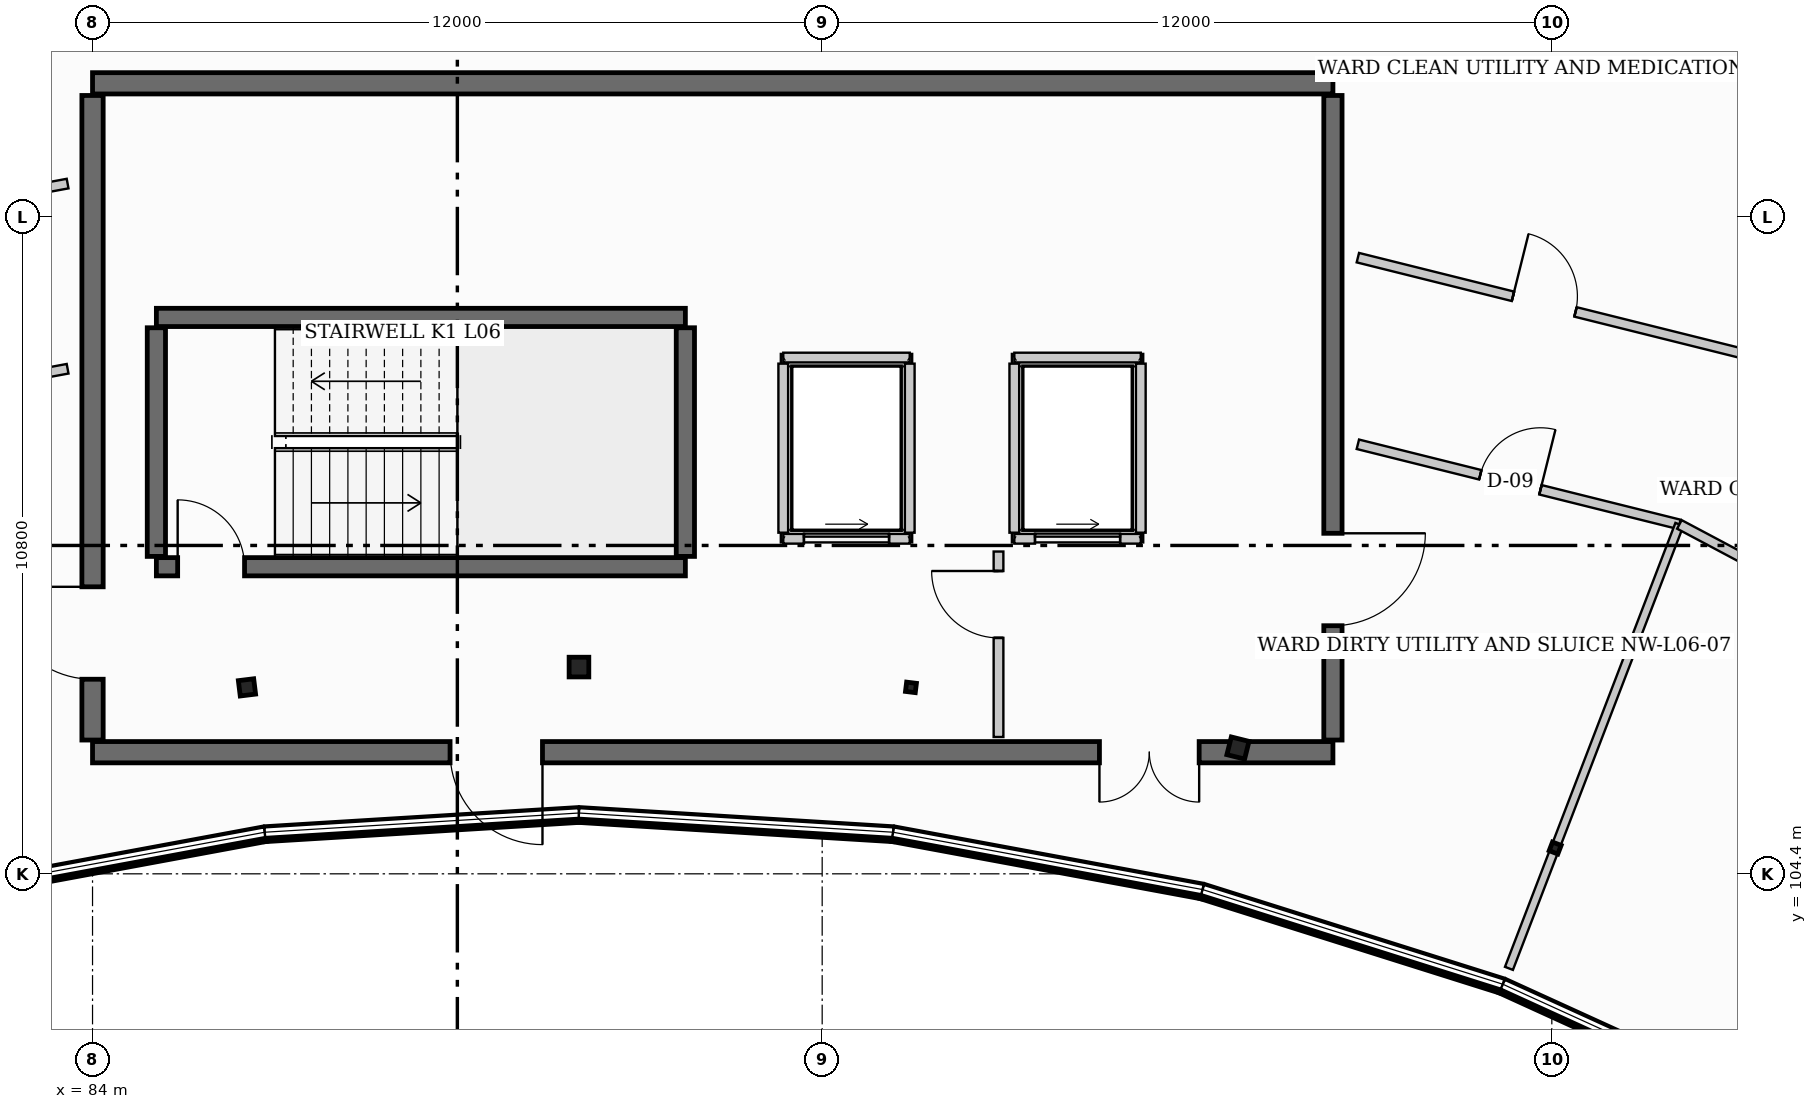
"""IFC4 building model, lengths in metres.
Left out: names, types, materials, properties, quantities, classifications, styles, units other than length and angle.
Written with IfcOpenShell. Run it as: python <this file> out.ifc"""

import sys

from ifc_helpers import new_model, si_unit, direction, frame, frame_2d, origin, origin_2d, place, context, subcontext, project, spatial, rectangle, hollow_rectangle, hollow_circle, i_section, extrude, element, fill, save


model = new_model("IFC4")
c1 = context("Model", 3, precision=1e-05, world=origin(), true_north=direction((0.0, 1.0)))
c2 = subcontext(c1, "Body", "Model", "MODEL_VIEW")
j1 = project(units=[si_unit("LENGTHUNIT", "METRE"), si_unit("PLANEANGLEUNIT", "RADIAN")], contexts=[c1])
p1 = place(None, origin())
s1 = spatial("IfcSite", under=j1, at=p1, CompositionType="ELEMENT")
p2 = place(p1, origin())
s2 = spatial("IfcBuilding", under=s1, at=p2, CompositionType="ELEMENT")
p3 = place(p2, frame((0.0, 0.0, 26.1)))
s3 = spatial("IfcBuildingStorey", under=s2, at=p3, CompositionType="ELEMENT", Elevation=26.1)
p4 = place(p3, frame((86.54, 107.466, 0.0), z_axis=(0.0, 0.0, 1.0), x_axis=(-0.121869343405, 0.992546151641, 0.0)))
e1 = element("IfcColumn", 1, at=p4, inside=s3, PredefinedType="COLUMN", context=c2, shape_type="SweptSolid", body=[
    extrude(i_section(OverallWidth=0.254, OverallDepth=0.254, WebThickness=0.009, FlangeThickness=0.014, at=origin_2d()), origin(), (0.0, 0.0, 1.0), 3.9),
])
p5 = place(p3, frame((92.0, 107.8, 0.0), z_axis=(0.0, 0.0, 1.0), x_axis=(0.0, 1.0, 0.0)))
e2 = element("IfcColumn", 2, at=p5, inside=s3, PredefinedType="COLUMN", context=c2, shape_type="SweptSolid", body=[
    extrude(hollow_circle(Radius=0.162, WallThickness=0.013, at=origin_2d()), origin(), (0.0, 0.0, 1.0), 3.9),
])
p6 = place(p3, frame((97.46, 107.466, 0.0), z_axis=(0.0, 0.0, 1.0), x_axis=(0.121869343405, 0.992546151641, 0.0)))
e3 = element("IfcColumn", 3, at=p6, inside=s3, PredefinedType="COLUMN", context=c2, shape_type="SweptSolid", body=[
    extrude(i_section(OverallWidth=0.154, OverallDepth=0.162, WebThickness=0.008, FlangeThickness=0.011, at=origin_2d()), origin(), (0.0, 0.0, 1.0), 3.9),
])
p7 = place(p3, frame((102.838, 106.469, 0.0), z_axis=(0.0, 0.0, 1.0), x_axis=(0.2419218956, 0.970295726276, 0.0)))
e4 = element("IfcColumn", 4, at=p7, inside=s3, PredefinedType="COLUMN", context=c2, shape_type="SweptSolid", body=[
    extrude(hollow_rectangle(XDim=0.3, YDim=0.3, WallThickness=0.012, at=origin_2d()), origin(), (0.0, 0.0, 1.0), 3.9),
])
p8 = place(p3, frame((108.055, 104.824, 0.0), z_axis=(0.0, 0.0, 1.0), x_axis=(0.358367949545, 0.933580426497, 0.0)))
e5 = element("IfcColumn", 5, at=p8, inside=s3, PredefinedType="COLUMN", context=c2, shape_type="SweptSolid", body=[
    extrude(i_section(OverallWidth=0.152, OverallDepth=0.152, WebThickness=0.006, FlangeThickness=0.007, at=origin_2d()), origin(), (0.0, 0.0, 1.0), 3.9),
])
p9 = place(p3, frame((84.0, 117.4, 0.0), z_axis=(0.0, 0.0, 1.0), x_axis=(1.0, 0.0, 0.0)))
e6 = element("IfcWall", 6, at=p9, inside=s3, PredefinedType="SHEAR", context=c2, shape_type="SweptSolid", body=[
    extrude(rectangle(XDim=20.4, YDim=0.35, at=frame_2d((10.2, 0.0))), origin(), (0.0, 0.0, 1.0), 3.9),
])
p10 = place(p3, frame((104.4, 106.4, 0.0), z_axis=(0.0, 0.0, 1.0), x_axis=(-1.0, 0.0, 0.0)))
e7 = element("IfcWall", 7, at=p10, inside=s3, PredefinedType="SHEAR", context=c2, shape_type="SweptSolid", body=[
    extrude(rectangle(XDim=20.4, YDim=0.35, at=frame_2d((10.2, 0.0))), origin(), (0.0, 0.0, 1.0), 3.9),
])
p11 = place(p10, frame((2.2, 0.0, 0.0)))
e8 = element("IfcOpeningElement", 8, at=p11, cuts=e7, PredefinedType="OPENING", context=c2, shape_type="SweptSolid", body=[
    extrude(rectangle(XDim=1.64, YDim=2.2, at=frame_2d((0.82, 1.1))), frame((0.0, 0.185, 0.0), z_axis=(0.0, -1.0, 0.0), x_axis=(1.0, 0.0, 0.0)), (0.0, 0.0, 1.0), 0.37),
])
p12 = place(p10, frame((13.0, 0.0, 0.0)))
e9 = element("IfcOpeningElement", 9, at=p12, cuts=e7, PredefinedType="OPENING", context=c2, shape_type="SweptSolid", body=[
    extrude(rectangle(XDim=1.52, YDim=2.16, at=frame_2d((0.76, 1.08))), frame((0.0, 0.185, 0.0), z_axis=(0.0, -1.0, 0.0), x_axis=(1.0, 0.0, 0.0)), (0.0, 0.0, 1.0), 0.37),
])
p13 = place(p3, frame((84.0, 106.6, 0.0), z_axis=(0.0, 0.0, 1.0), x_axis=(0.0, 1.0, 0.0)))
e10 = element("IfcWall", 10, at=p13, inside=s3, PredefinedType="SHEAR", context=c2, shape_type="SweptSolid", body=[
    extrude(rectangle(XDim=10.6, YDim=0.35, at=frame_2d((5.3, 0.0))), origin(), (0.0, 0.0, 1.0), 3.9),
])
p14 = place(p13, frame((1.0, 0.0, 0.0)))
e11 = element("IfcOpeningElement", 11, at=p14, cuts=e10, PredefinedType="OPENING", context=c2, shape_type="SweptSolid", body=[
    extrude(rectangle(XDim=1.52, YDim=2.16, at=frame_2d((0.76, 1.08))), frame((0.0, 0.185, 0.0), z_axis=(0.0, -1.0, 0.0), x_axis=(1.0, 0.0, 0.0)), (0.0, 0.0, 1.0), 0.37),
])
p15 = place(p3, frame((104.4, 117.2, 0.0), z_axis=(0.0, 0.0, 1.0), x_axis=(0.0, -1.0, 0.0)))
e12 = element("IfcWall", 12, at=p15, inside=s3, PredefinedType="SHEAR", context=c2, shape_type="SweptSolid", body=[
    extrude(rectangle(XDim=10.6, YDim=0.3, at=frame_2d((5.3, 0.0))), origin(), (0.0, 0.0, 1.0), 3.9),
])
p16 = place(p15, frame((7.2, 0.0, 0.0)))
e13 = element("IfcOpeningElement", 13, at=p16, cuts=e12, PredefinedType="OPENING", context=c2, shape_type="SweptSolid", body=[
    extrude(rectangle(XDim=1.52, YDim=2.16, at=frame_2d((0.76, 1.08))), frame((0.0, 0.16, 0.0), z_axis=(0.0, -1.0, 0.0), x_axis=(1.0, 0.0, 0.0)), (0.0, 0.0, 1.0), 0.32),
])
p17 = place(p3, frame((85.05, 109.45, 0.0), z_axis=(0.0, 0.0, 1.0), x_axis=(1.0, 0.0, 0.0)))
e14 = element("IfcWall", 14, at=p17, inside=s3, PredefinedType="SHEAR", context=c2, shape_type="SweptSolid", body=[
    extrude(rectangle(XDim=8.7, YDim=0.3, at=frame_2d((4.35, 0.0))), origin(), (0.0, 0.0, 1.0), 3.9),
])
p18 = place(p17, frame((0.35, 0.0, 0.0)))
e15 = element("IfcOpeningElement", 15, at=p18, cuts=e14, PredefinedType="OPENING", context=c2, shape_type="SweptSolid", body=[
    extrude(rectangle(XDim=1.1, YDim=2.15, at=frame_2d((0.55, 1.075))), frame((0.0, 0.16, 0.0), z_axis=(0.0, -1.0, 0.0), x_axis=(1.0, 0.0, 0.0)), (0.0, 0.0, 1.0), 0.32),
])
p19 = place(p3, frame((93.75, 113.55, 0.0), z_axis=(0.0, 0.0, 1.0), x_axis=(-1.0, 0.0, 0.0)))
e16 = element("IfcWall", 16, at=p19, inside=s3, PredefinedType="SHEAR", context=c2, shape_type="SweptSolid", body=[
    extrude(rectangle(XDim=8.7, YDim=0.3, at=frame_2d((4.35, 0.0))), origin(), (0.0, 0.0, 1.0), 3.9),
])
for number, where, z_axis, x_axis in (
    (17, (85.05, 109.62, 0.0), (0.0, 0.0, 1.0), (0.0, 1.0, 0.0)),
    (18, (93.75, 109.62, 0.0), (0.0, 0.0, 1.0), (0.0, 1.0, 0.0)),
):
    element("IfcWall", number, at=place(p3, frame(where, z_axis=z_axis, x_axis=x_axis)), inside=s3, PredefinedType="SHEAR", context=c2, shape_type="SweptSolid", body=[
        extrude(rectangle(XDim=3.76, YDim=0.3, at=frame_2d((1.88, 0.0))), origin(), (0.0, 0.0, 1.0), 3.9),
    ])
for number, where, z_axis, x_axis in (
    (19, (86.833, 105.084, 0.0), (0.0, 0.0, 1.0), (-0.983, -0.182, 0.0)),
    (20, (92.0, 105.4, 0.0), (0.0, 0.0, 1.0), (-0.998, -0.061, 0.0)),
    (21, (97.167, 105.084, 0.0), (0.0, 0.0, 1.0), (-0.998, 0.061, 0.0)),
    (22, (102.257, 104.141, 0.0), (0.0, 0.0, 1.0), (-0.983, 0.182, 0.0)),
):
    element("IfcWall", number, at=place(p3, frame(where, z_axis=z_axis, x_axis=x_axis)), inside=s3, PredefinedType="STANDARD", context=c2, shape_type="SweptSolid", body=[
        extrude(rectangle(XDim=5.177, YDim=0.22, at=frame_2d((2.588, 0.0))), origin(), (0.0, 0.0, 1.0), 1.05),
    ])
p20 = place(p3, frame((107.195, 102.584, 0.0), z_axis=(0.0, 0.0, 1.0), x_axis=(-0.953706582316, 0.300738681994, 0.0)))
e23 = element("IfcWall", 23, at=p20, inside=s3, PredefinedType="STANDARD", context=c2, shape_type="SweptSolid", body=[
    extrude(rectangle(XDim=5.178, YDim=0.22, at=frame_2d((2.589, 0.0))), origin(), (0.0, 0.0, 1.0), 1.05),
])
p21 = place(p3, frame((111.906, 100.437, 0.0), z_axis=(0.0, 0.0, 1.0), x_axis=(-0.909955822384, 0.414705198074, 0.0)))
e24 = element("IfcWall", 24, at=p21, inside=s3, PredefinedType="STANDARD", context=c2, shape_type="SweptSolid", body=[
    extrude(rectangle(XDim=5.177, YDim=0.22, at=frame_2d((2.588, 0.0))), origin(), (0.0, 0.0, 1.0), 1.05),
])
p22 = place(p3, frame((95.36, 109.91, 0.0), z_axis=(0.0, 0.0, 1.0), x_axis=(1.0, 0.0, 0.0)))
e25 = element("IfcWall", 25, at=p22, inside=s3, PredefinedType="PARTITIONING", context=c2, shape_type="SweptSolid", body=[
    extrude(rectangle(XDim=2.08, YDim=0.16, at=frame_2d((1.04, 0.0))), origin(), (0.0, 0.0, 1.0), 3.545),
])
p23 = place(p22, frame((0.34, 0.0, 0.0)))
e26 = element("IfcOpeningElement", 26, at=p23, cuts=e25, PredefinedType="OPENING", context=c2, shape_type="SweptSolid", body=[
    extrude(rectangle(XDim=1.4, YDim=2.2, at=frame_2d((0.7, 1.1))), frame((0.0, 0.09, 0.0), z_axis=(0.0, -1.0, 0.0), x_axis=(1.0, 0.0, 0.0)), (0.0, 0.0, 1.0), 0.18),
])
p24 = place(p3, frame((97.44, 112.89, 0.0), z_axis=(0.0, 0.0, 1.0), x_axis=(-1.0, 0.0, 0.0)))
e27 = element("IfcWall", 27, at=p24, inside=s3, PredefinedType="PARTITIONING", context=c2, shape_type="SweptSolid", body=[
    extrude(rectangle(XDim=2.08, YDim=0.16, at=frame_2d((1.04, 0.0))), origin(), (0.0, 0.0, 1.0), 3.545),
])
for number, where, z_axis, x_axis in (
    (28, (95.36, 112.79, 0.0), (0.0, 0.0, 1.0), (0.0, -1.0, 0.0)),
    (29, (97.44, 110.01, 0.0), (0.0, 0.0, 1.0), (0.0, 1.0, 0.0)),
):
    element("IfcWall", number, at=place(p3, frame(where, z_axis=z_axis, x_axis=x_axis)), inside=s3, PredefinedType="PARTITIONING", context=c2, shape_type="SweptSolid", body=[
        extrude(rectangle(XDim=2.78, YDim=0.16, at=frame_2d((1.39, 0.0))), origin(), (0.0, 0.0, 1.0), 3.545),
    ])
p25 = place(p3, frame((99.16, 109.91, 0.0), z_axis=(0.0, 0.0, 1.0), x_axis=(1.0, 0.0, 0.0)))
e30 = element("IfcWall", 30, at=p25, inside=s3, PredefinedType="PARTITIONING", context=c2, shape_type="SweptSolid", body=[
    extrude(rectangle(XDim=2.08, YDim=0.16, at=frame_2d((1.04, 0.0))), origin(), (0.0, 0.0, 1.0), 3.545),
])
p26 = place(p25, frame((0.34, 0.0, 0.0)))
e31 = element("IfcOpeningElement", 31, at=p26, cuts=e30, PredefinedType="OPENING", context=c2, shape_type="SweptSolid", body=[
    extrude(rectangle(XDim=1.4, YDim=2.2, at=frame_2d((0.7, 1.1))), frame((0.0, 0.09, 0.0), z_axis=(0.0, -1.0, 0.0), x_axis=(1.0, 0.0, 0.0)), (0.0, 0.0, 1.0), 0.18),
])
p27 = place(p3, frame((101.24, 112.89, 0.0), z_axis=(0.0, 0.0, 1.0), x_axis=(-1.0, 0.0, 0.0)))
e32 = element("IfcWall", 32, at=p27, inside=s3, PredefinedType="PARTITIONING", context=c2, shape_type="SweptSolid", body=[
    extrude(rectangle(XDim=2.08, YDim=0.16, at=frame_2d((1.04, 0.0))), origin(), (0.0, 0.0, 1.0), 3.545),
])
for number, where, z_axis, x_axis in (
    (33, (99.16, 112.79, 0.0), (0.0, 0.0, 1.0), (0.0, -1.0, 0.0)),
    (34, (101.24, 110.01, 0.0), (0.0, 0.0, 1.0), (0.0, 1.0, 0.0)),
):
    element("IfcWall", number, at=place(p3, frame(where, z_axis=z_axis, x_axis=x_axis)), inside=s3, PredefinedType="PARTITIONING", context=c2, shape_type="SweptSolid", body=[
        extrude(rectangle(XDim=2.78, YDim=0.16, at=frame_2d((1.39, 0.0))), origin(), (0.0, 0.0, 1.0), 3.545),
    ])
p28 = place(p3, frame((98.9, 106.65, 0.0), z_axis=(0.0, 0.0, 1.0), x_axis=(0.0, 1.0, 0.0)))
e35 = element("IfcWall", 35, at=p28, inside=s3, PredefinedType="PARTITIONING", context=c2, shape_type="SweptSolid", body=[
    extrude(rectangle(XDim=3.05, YDim=0.16, at=frame_2d((1.525, 0.0))), origin(), (0.0, 0.0, 1.0), 3.28),
])
p29 = place(p28, frame((1.63, 0.0, 0.0)))
e36 = element("IfcOpeningElement", 36, at=p29, cuts=e35, PredefinedType="OPENING", context=c2, shape_type="SweptSolid", body=[
    extrude(rectangle(XDim=1.1, YDim=2.15, at=frame_2d((0.55, 1.075))), frame((0.0, 0.09, 0.0), z_axis=(0.0, -1.0, 0.0), x_axis=(1.0, 0.0, 0.0)), (0.0, 0.0, 1.0), 0.18),
])
p30 = place(p3, frame((79.057, 114.911, 0.0), z_axis=(0.0, 0.0, 1.0), x_axis=(0.983258469263, 0.182216307235, 0.0)))
e37 = element("IfcWall", 37, at=p30, inside=s3, PredefinedType="PARTITIONING", context=c2, shape_type="SweptSolid", body=[
    extrude(rectangle(XDim=4.61, YDim=0.16, at=frame_2d((2.305, 0.0))), origin(), (0.0, 0.0, 1.0), 2.923),
])
p31 = place(p30, frame((1.655, 0.0, 0.0)))
e38 = element("IfcOpeningElement", 38, at=p31, cuts=e37, PredefinedType="OPENING", context=c2, shape_type="SweptSolid", body=[
    extrude(rectangle(XDim=1.2, YDim=2.12, at=frame_2d((0.6, 1.06))), frame((0.0, 0.09, 0.0), z_axis=(0.0, -1.0, 0.0), x_axis=(1.0, 0.0, 0.0)), (0.0, 0.0, 1.0), 0.18),
])
p32 = place(p3, frame((79.783, 112.0, 0.0), z_axis=(0.0, 0.0, 1.0), x_axis=(0.983234305922, 0.182346646962, 0.0)))
e39 = element("IfcWall", 39, at=p32, inside=s3, PredefinedType="PARTITIONING", context=c2, shape_type="SweptSolid", body=[
    extrude(rectangle(XDim=3.872, YDim=0.16, at=frame_2d((1.936, 0.0))), origin(), (0.0, 0.0, 1.0), 2.923),
])
p33 = place(p32, frame((1.286, 0.0, 0.0)))
e40 = element("IfcOpeningElement", 40, at=p33, cuts=e39, PredefinedType="OPENING", context=c2, shape_type="SweptSolid", body=[
    extrude(rectangle(XDim=1.12, YDim=2.08, at=frame_2d((0.56, 1.04))), frame((0.0, 0.09, 0.0), z_axis=(0.0, -1.0, 0.0), x_axis=(1.0, 0.0, 0.0)), (0.0, 0.0, 1.0), 0.18),
])
p34 = place(p3, frame((104.81, 114.533, 0.0), z_axis=(0.0, 0.0, 1.0), x_axis=(0.970315261497, -0.241843530625, 0.0)))
e41 = element("IfcWall", 41, at=p34, inside=s3, PredefinedType="PARTITIONING", context=c2, shape_type="SweptSolid", body=[
    extrude(rectangle(XDim=6.558, YDim=0.16, at=frame_2d((3.279, 0.0))), origin(), (0.0, 0.0, 1.0), 3.07),
])
p35 = place(p34, frame((2.629, 0.0, 0.0)))
e42 = element("IfcOpeningElement", 42, at=p35, cuts=e41, PredefinedType="OPENING", context=c2, shape_type="SweptSolid", body=[
    extrude(rectangle(XDim=1.06, YDim=2.1, at=frame_2d((0.53, 1.05))), frame((0.0, 0.09, 0.0), z_axis=(0.0, -1.0, 0.0), x_axis=(1.0, 0.0, 0.0)), (0.0, 0.0, 1.0), 0.18),
])
p36 = place(p3, frame((104.81, 111.464, 0.0), z_axis=(0.0, 0.0, 1.0), x_axis=(0.970308293834, -0.241871484298, 0.0)))
e43 = element("IfcWall", 43, at=p36, inside=s3, PredefinedType="PARTITIONING", context=c2, shape_type="SweptSolid", body=[
    extrude(rectangle(XDim=5.45, YDim=0.16, at=frame_2d((2.725, 0.0))), origin(), (0.0, 0.0, 1.0), 3.073),
])
p37 = place(p36, frame((2.075, 0.0, 0.0)))
e44 = element("IfcOpeningElement", 44, at=p37, cuts=e43, PredefinedType="OPENING", context=c2, shape_type="SweptSolid", body=[
    extrude(rectangle(XDim=1.02, YDim=2.08, at=frame_2d((0.51, 1.04))), frame((0.0, 0.09, 0.0), z_axis=(0.0, -1.0, 0.0), x_axis=(1.0, 0.0, 0.0)), (0.0, 0.0, 1.0), 0.18),
])
p38 = place(p3, frame((110.098, 110.146, 0.0), z_axis=(0.0, 0.0, 1.0), x_axis=(-0.358410014332, -0.933564278251, 0.0)))
e45 = element("IfcWall", 45, at=p38, inside=s3, PredefinedType="PARTITIONING", context=c2, shape_type="SweptSolid", body=[
    extrude(rectangle(XDim=7.821, YDim=0.14, at=frame_2d((3.91, 0.0))), origin(), (0.0, 0.0, 1.0), 3.073),
])
p39 = place(p3, frame((110.098, 110.146, 0.0), z_axis=(0.0, 0.0, 1.0), x_axis=(0.882958125757, -0.46945175275, 0.0)))
e46 = element("IfcWall", 46, at=p39, inside=s3, PredefinedType="PARTITIONING", context=c2, shape_type="SweptSolid", body=[
    extrude(rectangle(XDim=3.592, YDim=0.16, at=frame_2d((1.796, 0.0))), origin(), (0.0, 0.0, 1.0), 3.073),
])
p40 = place(p39, frame((1.146, 0.0, 0.0)))
e47 = element("IfcOpeningElement", 47, at=p40, cuts=e46, PredefinedType="OPENING", context=c2, shape_type="SweptSolid", body=[
    extrude(rectangle(XDim=0.9, YDim=2.1, at=frame_2d((0.45, 1.05))), frame((0.0, 0.09, 0.0), z_axis=(0.0, -1.0, 0.0), x_axis=(1.0, 0.0, 0.0)), (0.0, 0.0, 1.0), 0.18),
])
p41 = place(p23, origin())
e48 = element("IfcDoor", 48, at=p41, inside=s3, OperationType="SLIDING_TO_RIGHT", PredefinedType="DOOR", context=c2, shape_type="SweptSolid", body=[
    extrude(rectangle(XDim=1.4, YDim=2.2, at=frame_2d((0.7, 1.1))), frame((0.0, 0.025, 0.0), z_axis=(0.0, -1.0, 0.0), x_axis=(1.0, 0.0, 0.0)), (0.0, 0.0, 1.0), 0.05),
])
fill(e26, e48)
p42 = place(p26, origin())
e49 = element("IfcDoor", 49, at=p42, inside=s3, OperationType="SLIDING_TO_RIGHT", PredefinedType="DOOR", context=c2, shape_type="SweptSolid", body=[
    extrude(rectangle(XDim=1.4, YDim=2.2, at=frame_2d((0.7, 1.1))), frame((0.0, 0.025, 0.0), z_axis=(0.0, -1.0, 0.0), x_axis=(1.0, 0.0, 0.0)), (0.0, 0.0, 1.0), 0.05),
])
fill(e31, e49)
p43 = place(p18, origin())
e50 = element("IfcDoor", 50, at=p43, inside=s3, OperationType="SINGLE_SWING_LEFT", PredefinedType="DOOR", context=c2, shape_type="SweptSolid", body=[
    extrude(rectangle(XDim=1.1, YDim=2.15, at=frame_2d((0.55, 1.075))), frame((0.0, 0.025, 0.0), z_axis=(0.0, -1.0, 0.0), x_axis=(1.0, 0.0, 0.0)), (0.0, 0.0, 1.0), 0.05),
])
fill(e15, e50)
p44 = place(p11, origin())
e51 = element("IfcDoor", 51, at=p44, inside=s3, OperationType="DOUBLE_DOOR_SINGLE_SWING", PredefinedType="DOOR", context=c2, shape_type="SweptSolid", body=[
    extrude(rectangle(XDim=1.64, YDim=2.2, at=frame_2d((0.82, 1.1))), frame((0.0, 0.025, 0.0), z_axis=(0.0, -1.0, 0.0), x_axis=(1.0, 0.0, 0.0)), (0.0, 0.0, 1.0), 0.05),
])
fill(e8, e51)
p45 = place(p12, origin())
e52 = element("IfcDoor", 52, at=p45, inside=s3, OperationType="SINGLE_SWING_LEFT", PredefinedType="DOOR", context=c2, shape_type="SweptSolid", body=[
    extrude(rectangle(XDim=1.52, YDim=2.16, at=frame_2d((0.76, 1.08))), frame((0.0, 0.025, 0.0), z_axis=(0.0, -1.0, 0.0), x_axis=(1.0, 0.0, 0.0)), (0.0, 0.0, 1.0), 0.05),
])
fill(e9, e52)
p46 = place(p14, origin())
e53 = element("IfcDoor", 53, at=p46, inside=s3, OperationType="SINGLE_SWING_RIGHT", PredefinedType="DOOR", context=c2, shape_type="SweptSolid", body=[
    extrude(rectangle(XDim=1.52, YDim=2.16, at=frame_2d((0.76, 1.08))), frame((0.0, 0.025, 0.0), z_axis=(0.0, -1.0, 0.0), x_axis=(1.0, 0.0, 0.0)), (0.0, 0.0, 1.0), 0.05),
])
fill(e11, e53)
p47 = place(p16, origin())
e54 = element("IfcDoor", 54, at=p47, inside=s3, OperationType="SINGLE_SWING_LEFT", PredefinedType="DOOR", context=c2, shape_type="SweptSolid", body=[
    extrude(rectangle(XDim=1.52, YDim=2.16, at=frame_2d((0.76, 1.08))), frame((0.0, 0.025, 0.0), z_axis=(0.0, -1.0, 0.0), x_axis=(1.0, 0.0, 0.0)), (0.0, 0.0, 1.0), 0.05),
])
fill(e13, e54)
p48 = place(p29, origin())
e55 = element("IfcDoor", 55, at=p48, inside=s3, OperationType="SINGLE_SWING_RIGHT", PredefinedType="DOOR", context=c2, shape_type="SweptSolid", body=[
    extrude(rectangle(XDim=1.1, YDim=2.15, at=frame_2d((0.55, 1.075))), frame((0.0, 0.025, 0.0), z_axis=(0.0, -1.0, 0.0), x_axis=(1.0, 0.0, 0.0)), (0.0, 0.0, 1.0), 0.05),
])
fill(e36, e55)
p49 = place(p35, origin())
e56 = element("IfcDoor", 56, at=p49, inside=s3, OperationType="SINGLE_SWING_LEFT", PredefinedType="DOOR", context=c2, shape_type="SweptSolid", body=[
    extrude(rectangle(XDim=1.06, YDim=2.1, at=frame_2d((0.53, 1.05))), frame((0.0, 0.025, 0.0), z_axis=(0.0, -1.0, 0.0), x_axis=(1.0, 0.0, 0.0)), (0.0, 0.0, 1.0), 0.05),
])
fill(e42, e56)
p50 = place(p37, origin())
e57 = element("IfcDoor", 57, at=p50, inside=s3, OperationType="SINGLE_SWING_RIGHT", PredefinedType="DOOR", context=c2, shape_type="SweptSolid", body=[
    extrude(rectangle(XDim=1.02, YDim=2.08, at=frame_2d((0.51, 1.04))), frame((0.0, 0.025, 0.0), z_axis=(0.0, -1.0, 0.0), x_axis=(1.0, 0.0, 0.0)), (0.0, 0.0, 1.0), 0.05),
])
fill(e44, e57)
save(model, sys.argv[1])
